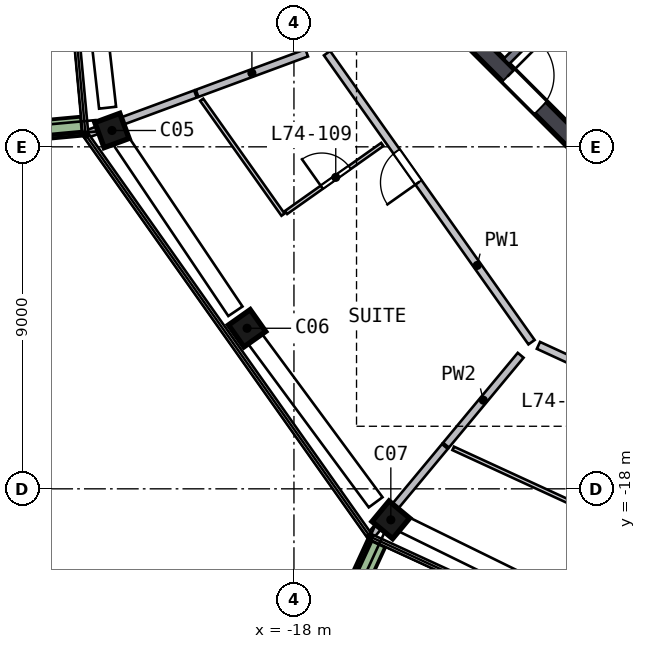
"""IFC4 building model, lengths in metres.
Left out: names, types, materials, properties, quantities, classifications, styles, units other than length and angle.
Written with IfcOpenShell. Run it as: python <this file> out.ifc"""

import sys

from ifc_helpers import new_model, si_unit, direction, frame, frame_2d, origin, origin_2d, place, context, subcontext, project, spatial, rectangle, extrude, element, fill, save


model = new_model("IFC4")
c1 = context("Model", 3, precision=1e-05, world=origin(), true_north=direction((0.0, 1.0)))
c2 = subcontext(c1, "Body", "Model", "MODEL_VIEW")
j1 = project(units=[si_unit("LENGTHUNIT", "METRE"), si_unit("PLANEANGLEUNIT", "RADIAN")], contexts=[c1])
p1 = place(None, origin())
s1 = spatial("IfcSite", under=j1, at=p1, CompositionType="ELEMENT")
p2 = place(p1, origin())
s2 = spatial("IfcBuilding", under=s1, at=p2, CompositionType="ELEMENT")
p3 = place(p2, frame((0.0, 0.0, 299.5)))
s3 = spatial("IfcBuildingStorey", under=s2, at=p3, CompositionType="ELEMENT", Elevation=299.5)
p4 = place(p3, frame((-22.839, -8.439, 0.0), z_axis=(0.041050726, -0.108252285, 0.993275531), x_axis=(-0.344292806, 0.931697214, 0.115770316)))
e1 = element("IfcColumn", 1, at=p4, inside=s3, PredefinedType="COLUMN", context=c2, shape_type="SweptSolid", body=[
    extrude(rectangle(XDim=0.7, YDim=0.7, at=origin_2d()), origin(), (0.0, 0.0, 1.0), 3.211),
])
p5 = place(p3, frame((-19.313, -13.664, 0.0), z_axis=(0.065781659, -0.09133384, 0.99364526), x_axis=(0.573853007, -0.811187112, -0.112553082)))
e2 = element("IfcColumn", 2, at=p5, inside=s3, PredefinedType="COLUMN", context=c2, shape_type="SweptSolid", body=[
    extrude(rectangle(XDim=0.7, YDim=0.7, at=origin_2d()), origin(), (0.0, 0.0, 1.0), 3.21),
])
p6 = place(p3, frame((-15.559, -18.728, 0.0), z_axis=(0.089627429, -0.073283156, 0.993275643), x_axis=(-0.763590768, 0.635237432, 0.115769356)))
e3 = element("IfcColumn", 3, at=p6, inside=s3, PredefinedType="COLUMN", context=c2, shape_type="SweptSolid", body=[
    extrude(rectangle(XDim=0.7, YDim=0.7, at=origin_2d()), origin(), (0.0, 0.0, 1.0), 3.211),
])
p7 = place(p3, frame((-13.841, -5.64, 0.0), z_axis=(0.0, 0.0, 1.0), x_axis=(0.707106781, -0.707106781, 0.0)))
e4 = element("IfcWall", 4, at=p7, inside=s3, PredefinedType="SHEAR", context=c2, shape_type="SweptSolid", body=[
    extrude(rectangle(XDim=11.598, YDim=0.45, at=frame_2d((5.799, 0.0))), origin(), (0.0, 0.0, 1.0), 3.5),
])
p8 = place(p7, frame((2.099, 0.0, 0.0)))
e5 = element("IfcOpeningElement", 5, at=p8, cuts=e4, PredefinedType="OPENING", context=c2, shape_type="SweptSolid", body=[
    extrude(rectangle(XDim=1.2, YDim=2.1, at=frame_2d((0.6, 1.05))), frame((0.0, 0.235, 0.0), z_axis=(0.0, -1.0, 0.0), x_axis=(1.0, 0.0, 0.0)), (0.0, 0.0, 1.0), 0.47),
])
p9 = place(p3, frame((-26.269, -8.704, 0.0), z_axis=(0.0, 0.0, 1.0), x_axis=(0.995751125, 0.092085269, 0.0)))
e6 = element("IfcWall", 6, at=p9, inside=s3, PredefinedType="SOLIDWALL", context=c2, shape_type="SweptSolid", body=[
    extrude(rectangle(XDim=2.699, YDim=0.5, at=frame_2d((1.35, 0.0))), origin(), (0.0, 0.0, 1.0), 0.7),
])
p10 = place(p3, frame((-15.822, -19.423, 0.0), z_axis=(0.0, 0.0, 1.0), x_axis=(-0.418225571, -0.908343202, 0.0)))
e7 = element("IfcWall", 7, at=p10, inside=s3, PredefinedType="SOLIDWALL", context=c2, shape_type="SweptSolid", body=[
    extrude(rectangle(XDim=3.199, YDim=0.5, at=frame_2d((1.6, 0.0))), origin(), (0.0, 0.0, 1.0), 0.7),
])
p11 = place(p3, frame((-9.334, -3.677, 0.0), z_axis=(0.0, 0.0, 1.0), x_axis=(-0.707106781, -0.707106781, 0.0)))
e8 = element("IfcWall", 8, at=p11, inside=s3, PredefinedType="SOLIDWALL", context=c2, shape_type="SweptSolid", body=[
    extrude(rectangle(XDim=4.35, YDim=0.2, at=frame_2d((2.175, 0.0))), origin(), (0.0, 0.0, 1.0), 3.19),
])
p12 = place(p3, frame((-11.749, -14.141, 0.0), z_axis=(0.0, 0.0, 1.0), x_axis=(-0.577581016, 0.81633337, 0.0)))
e9 = element("IfcWall", 9, at=p12, inside=s3, PredefinedType="SOLIDWALL", context=c2, shape_type="SweptSolid", body=[
    extrude(rectangle(XDim=9.317, YDim=0.2, at=frame_2d((4.658, 0.0))), origin(), (0.0, 0.0, 1.0), 3.19),
])
p13 = place(p12, frame((5.15, 0.0, 0.0)))
e10 = element("IfcOpeningElement", 10, at=p13, cuts=e9, PredefinedType="OPENING", context=c2, shape_type="SweptSolid", body=[
    extrude(rectangle(XDim=1.0, YDim=2.1, at=frame_2d((0.5, 1.05))), frame((0.0, 0.11, 0.0), z_axis=(0.0, -1.0, 0.0), x_axis=(1.0, 0.0, 0.0)), (0.0, 0.0, 1.0), 0.22),
])
p14 = place(p3, frame((-3.104, -18.121, 0.0), z_axis=(0.0, 0.0, 1.0), x_axis=(-0.908365452, 0.418177241, 0.0)))
e11 = element("IfcWall", 11, at=p14, inside=s3, PredefinedType="SOLIDWALL", context=c2, shape_type="SweptSolid", body=[
    extrude(rectangle(XDim=9.317, YDim=0.2, at=frame_2d((4.658, 0.0))), origin(), (0.0, 0.0, 1.0), 3.19),
])
p15 = place(p14, frame((5.15, 0.0, 0.0)))
e12 = element("IfcOpeningElement", 12, at=p15, cuts=e11, PredefinedType="OPENING", context=c2, shape_type="SweptSolid", body=[
    extrude(rectangle(XDim=1.0, YDim=2.1, at=frame_2d((0.5, 1.05))), frame((0.0, 0.11, 0.0), z_axis=(0.0, -1.0, 0.0), x_axis=(1.0, 0.0, 0.0)), (0.0, 0.0, 1.0), 0.22),
])
p16 = place(p3, frame((-20.592, -7.609, 0.0), z_axis=(0.0, 0.0, 1.0), x_axis=(-0.93799106, -0.346659445, 0.0)))
e13 = element("IfcWall", 13, at=p16, inside=s3, PredefinedType="SOLIDWALL", context=c2, shape_type="SweptSolid", body=[
    extrude(rectangle(XDim=3.011, YDim=0.2, at=frame_2d((1.506, 0.0))), origin(), (0.0, 0.0, 1.0), 3.19),
])
p17 = place(p3, frame((-17.665, -6.527, 0.0), z_axis=(0.0, 0.0, 1.0), x_axis=(-0.938011897, -0.346603059, 0.0)))
e14 = element("IfcWall", 14, at=p17, inside=s3, PredefinedType="SOLIDWALL", context=c2, shape_type="SweptSolid", body=[
    extrude(rectangle(XDim=3.075, YDim=0.2, at=frame_2d((1.537, 0.0))), origin(), (0.0, 0.0, 1.0), 3.19),
])
p18 = place(p3, frame((-14.029, -16.885, 0.0), z_axis=(0.0, 0.0, 1.0), x_axis=(-0.63904331, -0.769170754, 0.0)))
e15 = element("IfcWall", 15, at=p18, inside=s3, PredefinedType="SOLIDWALL", context=c2, shape_type="SweptSolid", body=[
    extrude(rectangle(XDim=3.011, YDim=0.2, at=frame_2d((1.506, 0.0))), origin(), (0.0, 0.0, 1.0), 3.19),
])
p19 = place(p3, frame((-12.034, -14.485, 0.0), z_axis=(0.0, 0.0, 1.0), x_axis=(-0.639035595, -0.769177163, 0.0)))
e16 = element("IfcWall", 16, at=p19, inside=s3, PredefinedType="SOLIDWALL", context=c2, shape_type="SweptSolid", body=[
    extrude(rectangle(XDim=3.075, YDim=0.2, at=frame_2d((1.537, 0.0))), origin(), (0.0, 0.0, 1.0), 3.19),
])
p20 = place(p3, frame((-18.288, -10.785, 0.0), z_axis=(0.0, 0.0, 1.0), x_axis=(-0.577591155, 0.816326196, 0.0)))
e17 = element("IfcWall", 17, at=p20, inside=s3, PredefinedType="PARTITIONING", context=c2, shape_type="SweptSolid", body=[
    extrude(rectangle(XDim=3.704, YDim=0.1, at=frame_2d((1.852, 0.0))), origin(), (0.0, 0.0, 1.0), 3.19),
])
p21 = place(p3, frame((-18.206, -10.727, 0.0), z_axis=(0.0, 0.0, 1.0), x_axis=(0.816316916, 0.57760427, 0.0)))
e18 = element("IfcWall", 18, at=p21, inside=s3, PredefinedType="PARTITIONING", context=c2, shape_type="SweptSolid", body=[
    extrude(rectangle(XDim=3.1, YDim=0.1, at=frame_2d((1.55, 0.0))), origin(), (0.0, 0.0, 1.0), 3.19),
])
p22 = place(p21, frame((1.15, 0.0, 0.0)))
e19 = element("IfcOpeningElement", 19, at=p22, cuts=e18, PredefinedType="OPENING", context=c2, shape_type="SweptSolid", body=[
    extrude(rectangle(XDim=0.9, YDim=2.1, at=frame_2d((0.45, 1.05))), frame((0.0, 0.06, 0.0), z_axis=(0.0, -1.0, 0.0), x_axis=(1.0, 0.0, 0.0)), (0.0, 0.0, 1.0), 0.12),
])
p23 = place(p3, frame((-10.445, -18.484, 0.0), z_axis=(0.0, 0.0, 1.0), x_axis=(-0.908371796, 0.418163462, 0.0)))
e20 = element("IfcWall", 20, at=p23, inside=s3, PredefinedType="PARTITIONING", context=c2, shape_type="SweptSolid", body=[
    extrude(rectangle(XDim=3.704, YDim=0.1, at=frame_2d((1.852, 0.0))), origin(), (0.0, 0.0, 1.0), 3.19),
])
p24 = place(p8, origin())
e21 = element("IfcDoor", 21, at=p24, inside=s3, OperationType="SINGLE_SWING_LEFT", PredefinedType="DOOR", context=c2, shape_type="SweptSolid", body=[
    extrude(rectangle(XDim=1.2, YDim=2.1, at=frame_2d((0.6, 1.05))), frame((0.0, 0.025, 0.0), z_axis=(0.0, -1.0, 0.0), x_axis=(1.0, 0.0, 0.0)), (0.0, 0.0, 1.0), 0.05),
])
fill(e5, e21)
p25 = place(p13, origin())
e22 = element("IfcDoor", 22, at=p25, inside=s3, OperationType="SINGLE_SWING_LEFT", PredefinedType="DOOR", context=c2, shape_type="SweptSolid", body=[
    extrude(rectangle(XDim=1.0, YDim=2.1, at=frame_2d((0.5, 1.05))), frame((0.0, 0.025, 0.0), z_axis=(0.0, -1.0, 0.0), x_axis=(1.0, 0.0, 0.0)), (0.0, 0.0, 1.0), 0.05),
])
fill(e10, e22)
p26 = place(p22, origin())
e23 = element("IfcDoor", 23, at=p26, inside=s3, OperationType="SINGLE_SWING_LEFT", PredefinedType="DOOR", context=c2, shape_type="SweptSolid", body=[
    extrude(rectangle(XDim=0.9, YDim=2.1, at=frame_2d((0.45, 1.05))), frame((0.0, 0.025, 0.0), z_axis=(0.0, -1.0, 0.0), x_axis=(1.0, 0.0, 0.0)), (0.0, 0.0, 1.0), 0.05),
])
fill(e19, e23)
save(model, sys.argv[1])
